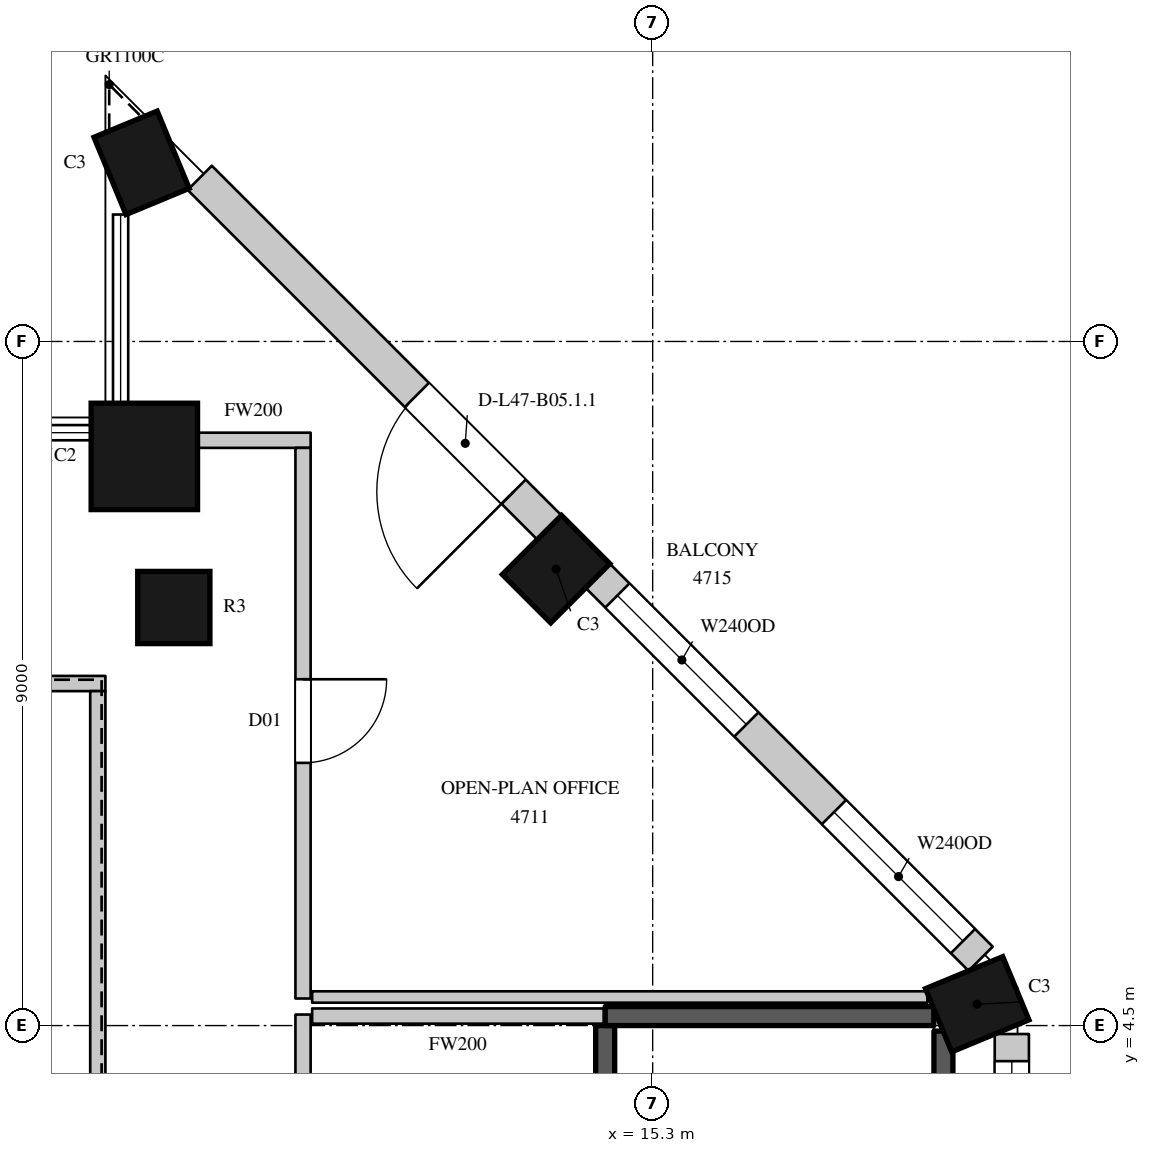
"""IFC4 building model, lengths in metres.
Left out: names, types, materials, properties, quantities, classifications, styles, units other than length and angle.
Written with IfcOpenShell. Run it as: python <this file> out.ifc"""

import sys

from ifc_helpers import new_model, si_unit, direction, frame, frame_2d, origin, origin_2d, place, context, subcontext, project, spatial, rectangle, circle, extrude, element, fill, save


model = new_model("IFC4")
c1 = context("Model", 3, precision=1e-05, world=origin(), true_north=direction((0.0, 1.0)))
c2 = subcontext(c1, "Body", "Model", "MODEL_VIEW")
j1 = project(units=[si_unit("LENGTHUNIT", "METRE"), si_unit("PLANEANGLEUNIT", "RADIAN")], contexts=[c1])
p1 = place(None, origin())
s1 = spatial("IfcSite", under=j1, at=p1, CompositionType="ELEMENT")
p2 = place(p1, origin())
s2 = spatial("IfcBuilding", under=s1, at=p2, CompositionType="ELEMENT")
p3 = place(p2, frame((0.0, 0.0, 213.8)))
s3 = spatial("IfcBuildingStorey", under=s2, at=p3, CompositionType="ELEMENT", Elevation=213.8)
for number, where, z_axis, x_axis in (
    (1, (19.57, 4.78, 0.0), (0.0, 0.0, 1.0), (-0.383, 0.924, 0.0)),
    (2, (14.029, 10.505, 0.0), (0.0, 0.0, 1.0), (-0.707, 0.707, 0.0)),
    (3, (8.576, 15.85, 0.0), (0.0, 0.0, 1.0), (-0.924, -0.383, 0.0)),
):
    element("IfcColumn", number, at=place(p3, frame(where, z_axis=z_axis, x_axis=x_axis)), inside=s3, PredefinedType="COLUMN", context=c2, shape_type="SweptSolid", body=[
        extrude(rectangle(XDim=0.9, YDim=1.1, at=origin_2d()), origin(), (0.0, 0.0, 1.0), 4.1),
    ])
p4 = place(p3, frame((8.612, 11.988, 0.0), z_axis=(0.0, 0.0, 1.0), x_axis=(1.0, 0.0, 0.0)))
e4 = element("IfcColumn", 4, at=p4, inside=s3, PredefinedType="COLUMN", context=c2, shape_type="SweptSolid", body=[
    extrude(circle(Radius=0.7, at=origin_2d()), origin(), (0.0, 0.0, 1.0), 4.1),
])
p5 = place(p3, frame((9.0, 10.0, 0.0), z_axis=(0.0, 0.0, 1.0), x_axis=(1.0, 0.0, 0.0)))
e5 = element("IfcColumn", 5, at=p5, inside=s3, PredefinedType="COLUMN", context=c2, shape_type="SweptSolid", body=[
    extrude(circle(Radius=0.475, at=origin_2d()), origin(), (0.0, 0.0, 1.0), 4.1),
])
p6 = place(p3, frame((20.025, -4.05, 0.0), z_axis=(0.0, 0.0, 1.0), x_axis=(0.0, 1.0, 0.0)))
e6 = element("IfcWall", 6, at=p6, inside=s3, PredefinedType="SOLIDWALL", context=c2, shape_type="SweptSolid", body=[
    extrude(rectangle(XDim=8.439, YDim=0.45, at=frame_2d((4.219, 0.0))), origin(), (0.0, 0.0, 1.0), 3.8),
])
p7 = place(p6, frame((0.394, 0.0, 1.05)))
e7 = element("IfcOpeningElement", 7, at=p7, cuts=e6, PredefinedType="OPENING", context=c2, shape_type="SweptSolid", body=[
    extrude(rectangle(XDim=3.0, YDim=2.4, at=frame_2d((1.5, 1.2))), frame((0.0, 0.235, 0.0), z_axis=(0.0, -1.0, 0.0), x_axis=(1.0, 0.0, 0.0)), (0.0, 0.0, 1.0), 0.47),
])
p8 = place(p6, frame((5.082, 0.0, 1.05)))
e8 = element("IfcOpeningElement", 8, at=p8, cuts=e6, PredefinedType="OPENING", context=c2, shape_type="SweptSolid", body=[
    extrude(rectangle(XDim=3.0, YDim=2.4, at=frame_2d((1.5, 1.2))), frame((0.0, 0.235, 0.0), z_axis=(0.0, -1.0, 0.0), x_axis=(1.0, 0.0, 0.0)), (0.0, 0.0, 1.0), 0.47),
])
p9 = place(p3, frame((19.615, 5.379, 0.0), z_axis=(0.0, 0.0, 1.0), x_axis=(-0.707089646058, 0.7071239159, 0.0)))
e9 = element("IfcWall", 9, at=p9, inside=s3, PredefinedType="SOLIDWALL", context=c2, shape_type="SweptSolid", body=[
    extrude(rectangle(XDim=7.124, YDim=0.45, at=frame_2d((3.562, 0.0))), origin(), (0.0, 0.0, 1.0), 3.8),
])
p10 = place(p9, frame((0.328, 0.0, 1.05)))
e10 = element("IfcOpeningElement", 10, at=p10, cuts=e9, PredefinedType="OPENING", context=c2, shape_type="SweptSolid", body=[
    extrude(rectangle(XDim=2.4, YDim=2.4, at=frame_2d((1.2, 1.2))), frame((0.0, 0.235, 0.0), z_axis=(0.0, -1.0, 0.0), x_axis=(1.0, 0.0, 0.0)), (0.0, 0.0, 1.0), 0.47),
])
p11 = place(p9, frame((4.359, 0.0, 1.05)))
e11 = element("IfcOpeningElement", 11, at=p11, cuts=e9, PredefinedType="OPENING", context=c2, shape_type="SweptSolid", body=[
    extrude(rectangle(XDim=2.4, YDim=2.4, at=frame_2d((1.2, 1.2))), frame((0.0, 0.235, 0.0), z_axis=(0.0, -1.0, 0.0), x_axis=(1.0, 0.0, 0.0)), (0.0, 0.0, 1.0), 0.47),
])
p12 = place(p3, frame((13.941, 11.053, 0.0), z_axis=(0.0, 0.0, 1.0), x_axis=(-0.707106781187, 0.707106781187, 0.0)))
e12 = element("IfcWall", 12, at=p12, inside=s3, PredefinedType="SOLIDWALL", context=c2, shape_type="SweptSolid", body=[
    extrude(rectangle(XDim=6.505, YDim=0.45, at=frame_2d((3.252, 0.0))), origin(), (0.0, 0.0, 1.0), 3.8),
])
p13 = place(p12, frame((0.665, 0.0, 0.0)))
e13 = element("IfcOpeningElement", 13, at=p13, cuts=e12, PredefinedType="OPENING", context=c2, shape_type="SweptSolid", body=[
    extrude(rectangle(XDim=1.8, YDim=2.4, at=frame_2d((0.9, 1.2))), frame((0.0, 0.235, 0.0), z_axis=(0.0, -1.0, 0.0), x_axis=(1.0, 0.0, 0.0)), (0.0, 0.0, 1.0), 0.47),
])
p14 = place(p3, frame((16.206, 10.308, 0.0), z_axis=(0.0, 0.0, 1.0), x_axis=(-0.707057827829, 0.707155731156, 0.0)))
e14 = element("IfcWall", 14, at=p14, inside=s3, PredefinedType="SOLIDWALL", context=c2, shape_type="SweptSolid", body=[
    extrude(rectangle(XDim=2.494, YDim=0.45, at=frame_2d((1.247, 0.0))), origin(), (0.0, 0.0, 1.0), 0.6),
])
p15 = place(p3, frame((-6.1, 9.0, 0.0), z_axis=(0.0, 0.0, 1.0), x_axis=(1.0, 0.0, 0.0)))
e15 = element("IfcWall", 15, at=p15, inside=s3, PredefinedType="PARTITIONING", context=c2, shape_type="SweptSolid", body=[
    extrude(rectangle(XDim=14.2, YDim=0.2, at=frame_2d((7.1, 0.0))), origin(), (0.0, 0.0, 1.0), 3.8),
])
p16 = place(p3, frame((8.0, -4.48, 0.0), z_axis=(0.0, 0.0, 1.0), x_axis=(0.0, 1.0, 0.0)))
e16 = element("IfcWall", 16, at=p16, inside=s3, PredefinedType="PARTITIONING", context=c2, shape_type="SweptSolid", body=[
    extrude(rectangle(XDim=13.38, YDim=0.2, at=frame_2d((6.69, 0.0))), origin(), (0.0, 0.0, 1.0), 3.8),
])
p17 = place(p3, frame((9.296, 12.2, 0.0), z_axis=(0.0, 0.0, 1.0), x_axis=(1.0, 0.0, 0.0)))
e17 = element("IfcWall", 17, at=p17, inside=s3, PredefinedType="PARTITIONING", context=c2, shape_type="SweptSolid", body=[
    extrude(rectangle(XDim=1.504, YDim=0.2, at=frame_2d((0.752, 0.0))), origin(), (0.0, 0.0, 1.0), 3.8),
])
p18 = place(p3, frame((10.7, -11.7, 0.0), z_axis=(0.0, 0.0, 1.0), x_axis=(0.0, 1.0, 0.0)))
e18 = element("IfcWall", 18, at=p18, inside=s3, PredefinedType="PARTITIONING", context=c2, shape_type="SweptSolid", body=[
    extrude(rectangle(XDim=16.345, YDim=0.2, at=frame_2d((8.172, 0.0))), origin(), (0.0, 0.0, 1.0), 3.8),
])
p19 = place(p18, frame((12.35, 0.0, 0.0)))
e19 = element("IfcOpeningElement", 19, at=p19, cuts=e18, PredefinedType="OPENING", context=c2, shape_type="SweptSolid", body=[
    extrude(rectangle(XDim=1.5, YDim=2.4, at=frame_2d((0.75, 1.2))), frame((0.0, 0.11, 0.0), z_axis=(0.0, -1.0, 0.0), x_axis=(1.0, 0.0, 0.0)), (0.0, 0.0, 1.0), 0.22),
])
p20 = place(p18, frame((3.0, 0.0, 0.0)))
e20 = element("IfcOpeningElement", 20, at=p20, cuts=e18, PredefinedType="OPENING", context=c2, shape_type="SweptSolid", body=[
    extrude(rectangle(XDim=1.1, YDim=2.4, at=frame_2d((0.55, 1.2))), frame((0.0, 0.11, 0.0), z_axis=(0.0, -1.0, 0.0), x_axis=(1.0, 0.0, 0.0)), (0.0, 0.0, 1.0), 0.22),
])
p21 = place(p3, frame((10.7, 4.856, 0.0), z_axis=(0.0, 0.0, 1.0), x_axis=(0.0, 1.0, 0.0)))
e21 = element("IfcWall", 21, at=p21, inside=s3, PredefinedType="PARTITIONING", context=c2, shape_type="SweptSolid", body=[
    extrude(rectangle(XDim=7.244, YDim=0.2, at=frame_2d((3.622, 0.0))), origin(), (0.0, 0.0, 1.0), 3.8),
])
p22 = place(p21, frame((3.1, 0.0, 0.0)))
e22 = element("IfcOpeningElement", 22, at=p22, cuts=e21, PredefinedType="OPENING", context=c2, shape_type="SweptSolid", body=[
    extrude(rectangle(XDim=1.1, YDim=2.4, at=frame_2d((0.55, 1.2))), frame((0.0, 0.11, 0.0), z_axis=(0.0, -1.0, 0.0), x_axis=(1.0, 0.0, 0.0)), (0.0, 0.0, 1.0), 0.22),
])
p23 = place(p3, frame((10.82, 4.625, 0.0), z_axis=(0.0, 0.0, 1.0), x_axis=(1.0, 0.0, 0.0)))
e23 = element("IfcWall", 23, at=p23, inside=s3, PredefinedType="PARTITIONING", context=c2, shape_type="SweptSolid", body=[
    extrude(rectangle(XDim=3.835, YDim=0.2, at=frame_2d((1.917, 0.0))), origin(), (0.0, 0.0, 1.0), 3.8),
])
p24 = place(p3, frame((10.82, 4.876, 0.0), z_axis=(0.0, 0.0, 1.0), x_axis=(1.0, 0.0, 0.0)))
e24 = element("IfcWall", 24, at=p24, inside=s3, PredefinedType="PARTITIONING", context=c2, shape_type="SweptSolid", body=[
    extrude(rectangle(XDim=8.095, YDim=0.15, at=frame_2d((4.047, 0.0))), origin(), (0.0, 0.0, 1.0), 3.8),
])
p25 = place(p3, frame((14.675, -4.5, 0.0), z_axis=(0.0, 0.0, 1.0), x_axis=(0.0, 1.0, 0.0)))
e25 = element("IfcWall", 25, at=p25, inside=s3, PredefinedType="SHEAR", context=c2, shape_type="SweptSolid", body=[
    extrude(rectangle(XDim=9.0, YDim=0.25, at=frame_2d((4.5, 0.0))), origin(), (0.0, 0.0, 1.0), 3.8),
])
p26 = place(p25, frame((0.45, 0.0, 0.0)))
e26 = element("IfcOpeningElement", 26, at=p26, cuts=e25, PredefinedType="OPENING", context=c2, shape_type="SweptSolid", body=[
    extrude(rectangle(XDim=1.1, YDim=2.2, at=frame_2d((0.55, 1.1))), frame((0.0, 0.135, 0.0), z_axis=(0.0, -1.0, 0.0), x_axis=(1.0, 0.0, 0.0)), (0.0, 0.0, 1.0), 0.27),
])
p27 = place(p3, frame((14.675, 4.625, 0.0), z_axis=(0.0, 0.0, 1.0), x_axis=(1.0, 0.0, 0.0)))
e27 = element("IfcWall", 27, at=p27, inside=s3, PredefinedType="SHEAR", context=c2, shape_type="SweptSolid", body=[
    extrude(rectangle(XDim=4.324, YDim=0.25, at=frame_2d((2.162, 0.0))), origin(), (0.0, 0.0, 1.0), 3.8),
])
p28 = place(p3, frame((19.125, -4.05, 0.0), z_axis=(0.0, 0.0, 1.0), x_axis=(0.0, 1.0, 0.0)))
e28 = element("IfcWall", 28, at=p28, inside=s3, PredefinedType="SHEAR", context=c2, shape_type="SweptSolid", body=[
    extrude(rectangle(XDim=8.477, YDim=0.25, at=frame_2d((4.238, 0.0))), origin(), (0.0, 0.0, 1.0), 3.8),
])
p29 = place(p8, origin())
e29 = element("IfcWindow", 29, at=p29, inside=s3, PartitioningType="SINGLE_PANEL", PredefinedType="WINDOW", context=c2, shape_type="SweptSolid", body=[
    extrude(rectangle(XDim=3.0, YDim=2.4, at=frame_2d((1.5, 1.2))), frame((0.0, 0.135, 0.0), z_axis=(0.0, -1.0, 0.0), x_axis=(1.0, 0.0, 0.0)), (0.0, 0.0, 1.0), 0.06),
])
fill(e8, e29)
p30 = place(p10, origin())
e30 = element("IfcWindow", 30, at=p30, inside=s3, PartitioningType="SINGLE_PANEL", PredefinedType="WINDOW", context=c2, shape_type="SweptSolid", body=[
    extrude(rectangle(XDim=2.4, YDim=2.4, at=frame_2d((1.2, 1.2))), frame((0.0, 0.135, 0.0), z_axis=(0.0, -1.0, 0.0), x_axis=(1.0, 0.0, 0.0)), (0.0, 0.0, 1.0), 0.06),
])
fill(e10, e30)
p31 = place(p11, origin())
e31 = element("IfcWindow", 31, at=p31, inside=s3, PartitioningType="SINGLE_PANEL", PredefinedType="WINDOW", context=c2, shape_type="SweptSolid", body=[
    extrude(rectangle(XDim=2.4, YDim=2.4, at=frame_2d((1.2, 1.2))), frame((0.0, 0.135, 0.0), z_axis=(0.0, -1.0, 0.0), x_axis=(1.0, 0.0, 0.0)), (0.0, 0.0, 1.0), 0.06),
])
fill(e11, e31)
p32 = place(p13, origin())
e32 = element("IfcDoor", 32, at=p32, inside=s3, OperationType="SLIDING_TO_LEFT", PredefinedType="DOOR", context=c2, shape_type="SweptSolid", body=[
    extrude(rectangle(XDim=1.8, YDim=2.4, at=frame_2d((0.9, 1.2))), frame((0.0, 0.13, 0.0), z_axis=(0.0, -1.0, 0.0), x_axis=(1.0, 0.0, 0.0)), (0.0, 0.0, 1.0), 0.05),
])
fill(e13, e32)
p33 = place(p22, origin())
e33 = element("IfcDoor", 33, at=p33, inside=s3, OperationType="SINGLE_SWING_LEFT", PredefinedType="DOOR", context=c2, shape_type="SweptSolid", body=[
    extrude(rectangle(XDim=1.1, YDim=2.4, at=frame_2d((0.55, 1.2))), frame((0.0, 0.025, 0.0), z_axis=(0.0, -1.0, 0.0), x_axis=(1.0, 0.0, 0.0)), (0.0, 0.0, 1.0), 0.05),
])
fill(e22, e33)
save(model, sys.argv[1])
